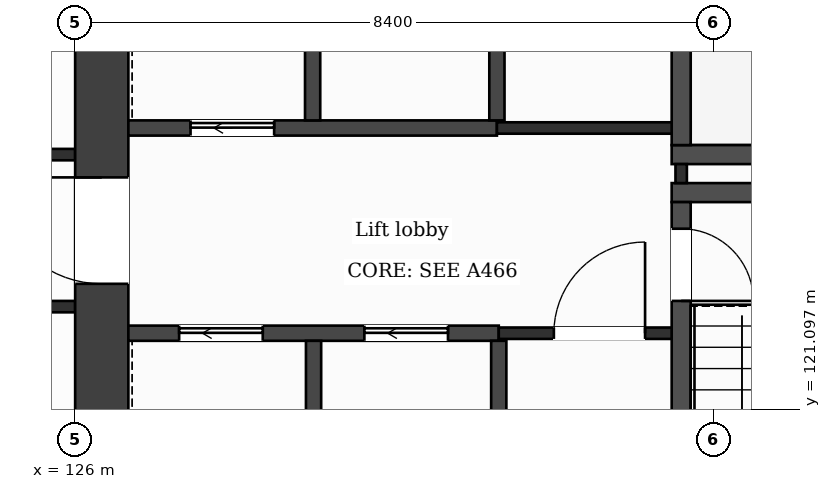
"""IFC4 building model, lengths in metres.
Left out: names, types, materials, properties, quantities, classifications, styles, units other than length and angle.
Written with IfcOpenShell. Run it as: python <this file> out.ifc"""

import sys

from ifc_helpers import new_model, si_unit, direction, frame, frame_2d, origin, place, context, subcontext, project, spatial, rectangle, extrude, element, fill, save


model = new_model("IFC4")
c1 = context("Model", 3, precision=1e-05, world=origin(), true_north=direction((0.0, 1.0)))
c2 = subcontext(c1, "Body", "Model", "MODEL_VIEW")
j1 = project(units=[si_unit("LENGTHUNIT", "METRE"), si_unit("PLANEANGLEUNIT", "RADIAN")], contexts=[c1])
p1 = place(None, origin())
s1 = spatial("IfcSite", under=j1, at=p1, CompositionType="ELEMENT")
p2 = place(p1, origin())
s2 = spatial("IfcBuilding", under=s1, at=p2, CompositionType="ELEMENT")
p3 = place(p2, frame((0.0, 0.0, 270.1)))
s3 = spatial("IfcBuildingStorey", under=s2, at=p3, CompositionType="ELEMENT", Elevation=270.1)
p4 = place(p3, frame((126.35, 110.75, 0.0), z_axis=(0.0, 0.0, 1.0), x_axis=(0.0, 1.0, 0.0)))
e1 = element("IfcWall", 1, at=p4, inside=s3, PredefinedType="SHEAR", context=c2, shape_type="SweptSolid", body=[
    extrude(rectangle(XDim=21.3, YDim=0.7, at=frame_2d((10.65, 0.0))), origin(), (0.0, 0.0, 1.0), 3.7),
])
p5 = place(p4, frame((12.0, 0.0, 0.0)))
e2 = element("IfcOpeningElement", 2, at=p5, cuts=e1, PredefinedType="OPENING", context=c2, shape_type="SweptSolid", body=[
    extrude(rectangle(XDim=1.4, YDim=2.1, at=frame_2d((0.7, 1.05))), frame((0.0, 0.36, 0.0), z_axis=(0.0, -1.0, 0.0), x_axis=(1.0, 0.0, 0.0)), (0.0, 0.0, 1.0), 0.72),
])
p6 = place(p3, frame((126.7, 122.1, 0.0), z_axis=(0.0, 0.0, 1.0), x_axis=(1.0, 0.0, 0.0)))
e3 = element("IfcWall", 3, at=p6, inside=s3, PredefinedType="PARTITIONING", context=c2, shape_type="SweptSolid", body=[
    extrude(rectangle(XDim=4.873, YDim=0.2, at=frame_2d((2.437, 0.0))), origin(), (0.0, 0.0, 1.0), 3.38),
])
p7 = place(p6, frame((3.105, 0.0, 0.0)))
e4 = element("IfcOpeningElement", 4, at=p7, cuts=e3, PredefinedType="OPENING", context=c2, shape_type="SweptSolid", body=[
    extrude(rectangle(XDim=1.1, YDim=2.1, at=frame_2d((0.55, 1.05))), frame((0.0, 0.11, 0.0), z_axis=(0.0, -1.0, 0.0), x_axis=(1.0, 0.0, 0.0)), (0.0, 0.0, 1.0), 0.22),
])
p8 = place(p6, frame((0.668, 0.0, 0.0)))
e5 = element("IfcOpeningElement", 5, at=p8, cuts=e3, PredefinedType="OPENING", context=c2, shape_type="SweptSolid", body=[
    extrude(rectangle(XDim=1.1, YDim=2.1, at=frame_2d((0.55, 1.05))), frame((0.0, 0.11, 0.0), z_axis=(0.0, -1.0, 0.0), x_axis=(1.0, 0.0, 0.0)), (0.0, 0.0, 1.0), 0.22),
])
p9 = place(p3, frame((131.573, 122.1, 0.0), z_axis=(0.0, 0.0, 1.0), x_axis=(1.0, 0.0, 0.0)))
e6 = element("IfcWall", 6, at=p9, inside=s3, PredefinedType="PARTITIONING", context=c2, shape_type="SweptSolid", body=[
    extrude(rectangle(XDim=2.4, YDim=0.15, at=frame_2d((1.2, 0.0))), origin(), (0.0, 0.0, 1.0), 3.38),
])
p10 = place(p9, frame((0.725, 0.0, 0.0)))
e7 = element("IfcOpeningElement", 7, at=p10, cuts=e6, PredefinedType="OPENING", context=c2, shape_type="SweptSolid", body=[
    extrude(rectangle(XDim=1.2, YDim=2.1, at=frame_2d((0.6, 1.05))), frame((0.0, 0.085, 0.0), z_axis=(0.0, -1.0, 0.0), x_axis=(1.0, 0.0, 0.0)), (0.0, 0.0, 1.0), 0.17),
])
p11 = place(p3, frame((100.8, 122.45, 0.0), z_axis=(0.0, 0.0, 1.0), x_axis=(1.0, 0.0, 0.0)))
e8 = element("IfcWall", 8, at=p11, inside=s3, PredefinedType="PARTITIONING", context=c2, shape_type="SweptSolid", body=[
    extrude(rectangle(XDim=25.2, YDim=0.15, at=frame_2d((12.6, 0.0))), origin(), (0.0, 0.0, 1.0), 3.38),
])
p12 = place(p11, frame((5.55, 0.0, 0.0)))
e9 = element("IfcOpeningElement", 9, at=p12, cuts=e8, PredefinedType="OPENING", context=c2, shape_type="SweptSolid", body=[
    extrude(rectangle(XDim=1.0, YDim=2.1, at=frame_2d((0.5, 1.05))), frame((0.0, 0.085, 0.0), z_axis=(0.0, -1.0, 0.0), x_axis=(1.0, 0.0, 0.0)), (0.0, 0.0, 1.0), 0.17),
])
p13 = place(p11, frame((8.862, 0.0, 0.0)))
e10 = element("IfcOpeningElement", 10, at=p13, cuts=e8, PredefinedType="OPENING", context=c2, shape_type="SweptSolid", body=[
    extrude(rectangle(XDim=0.95, YDim=2.1, at=frame_2d((0.475, 1.05))), frame((0.0, 0.085, 0.0), z_axis=(0.0, -1.0, 0.0), x_axis=(1.0, 0.0, 0.0)), (0.0, 0.0, 1.0), 0.17),
])
p14 = place(p11, frame((15.2, 0.0, 0.0)))
e11 = element("IfcOpeningElement", 11, at=p14, cuts=e8, PredefinedType="OPENING", context=c2, shape_type="SweptSolid", body=[
    extrude(rectangle(XDim=0.95, YDim=2.1, at=frame_2d((0.475, 1.05))), frame((0.0, 0.085, 0.0), z_axis=(0.0, -1.0, 0.0), x_axis=(1.0, 0.0, 0.0)), (0.0, 0.0, 1.0), 0.17),
])
p15 = place(p11, frame((17.325, 0.0, 0.0)))
e12 = element("IfcOpeningElement", 12, at=p15, cuts=e8, PredefinedType="OPENING", context=c2, shape_type="SweptSolid", body=[
    extrude(rectangle(XDim=1.0, YDim=2.1, at=frame_2d((0.5, 1.05))), frame((0.0, 0.085, 0.0), z_axis=(0.0, -1.0, 0.0), x_axis=(1.0, 0.0, 0.0)), (0.0, 0.0, 1.0), 0.17),
])
p16 = place(p11, frame((23.862, 0.0, 0.0)))
e13 = element("IfcOpeningElement", 13, at=p16, cuts=e8, PredefinedType="OPENING", context=c2, shape_type="SweptSolid", body=[
    extrude(rectangle(XDim=0.95, YDim=2.1, at=frame_2d((0.475, 1.05))), frame((0.0, 0.085, 0.0), z_axis=(0.0, -1.0, 0.0), x_axis=(1.0, 0.0, 0.0)), (0.0, 0.0, 1.0), 0.17),
])
for number, where, z_axis, x_axis in (
    (14, (133.848, 123.95, 0.0), (0.0, 0.0, 1.0), (1.0, 0.0, 0.0)),
    (15, (133.848, 124.45, 0.0), (0.0, 0.0, 1.0), (1.0, 0.0, 0.0)),
):
    element("IfcWall", number, at=place(p3, frame(where, z_axis=z_axis, x_axis=x_axis)), inside=s3, PredefinedType="PARTITIONING", context=c2, shape_type="SweptSolid", body=[
        extrude(rectangle(XDim=3.4, YDim=0.25, at=frame_2d((1.7, 0.0))), origin(), (0.0, 0.0, 1.0), 3.38),
    ])
p17 = place(p3, frame((100.8, 124.45, 0.0), z_axis=(0.0, 0.0, 1.0), x_axis=(1.0, 0.0, 0.0)))
e16 = element("IfcWall", 16, at=p17, inside=s3, PredefinedType="PARTITIONING", context=c2, shape_type="SweptSolid", body=[
    extrude(rectangle(XDim=25.2, YDim=0.15, at=frame_2d((12.6, 0.0))), origin(), (0.0, 0.0, 1.0), 3.38),
])
p18 = place(p17, frame((6.125, 0.0, 0.0)))
e17 = element("IfcOpeningElement", 17, at=p18, cuts=e16, PredefinedType="OPENING", context=c2, shape_type="SweptSolid", body=[
    extrude(rectangle(XDim=1.0, YDim=2.1, at=frame_2d((0.5, 1.05))), frame((0.0, 0.085, 0.0), z_axis=(0.0, -1.0, 0.0), x_axis=(1.0, 0.0, 0.0)), (0.0, 0.0, 1.0), 0.17),
])
p19 = place(p17, frame((1.325, 0.0, 0.0)))
e18 = element("IfcOpeningElement", 18, at=p19, cuts=e16, PredefinedType="OPENING", context=c2, shape_type="SweptSolid", body=[
    extrude(rectangle(XDim=1.0, YDim=2.1, at=frame_2d((0.5, 1.05))), frame((0.0, 0.085, 0.0), z_axis=(0.0, -1.0, 0.0), x_axis=(1.0, 0.0, 0.0)), (0.0, 0.0, 1.0), 0.17),
])
p20 = place(p17, frame((11.43, 0.0, 0.0)))
e19 = element("IfcOpeningElement", 19, at=p20, cuts=e16, PredefinedType="OPENING", context=c2, shape_type="SweptSolid", body=[
    extrude(rectangle(XDim=1.0, YDim=2.1, at=frame_2d((0.5, 1.05))), frame((0.0, 0.085, 0.0), z_axis=(0.0, -1.0, 0.0), x_axis=(1.0, 0.0, 0.0)), (0.0, 0.0, 1.0), 0.17),
])
p21 = place(p17, frame((21.17, 0.0, 0.0)))
e20 = element("IfcOpeningElement", 20, at=p21, cuts=e16, PredefinedType="OPENING", context=c2, shape_type="SweptSolid", body=[
    extrude(rectangle(XDim=1.0, YDim=2.1, at=frame_2d((0.5, 1.05))), frame((0.0, 0.085, 0.0), z_axis=(0.0, -1.0, 0.0), x_axis=(1.0, 0.0, 0.0)), (0.0, 0.0, 1.0), 0.17),
])
p22 = place(p3, frame((126.7, 124.8, 0.0), z_axis=(0.0, 0.0, 1.0), x_axis=(1.0, 0.0, 0.0)))
e21 = element("IfcWall", 21, at=p22, inside=s3, PredefinedType="PARTITIONING", context=c2, shape_type="SweptSolid", body=[
    extrude(rectangle(XDim=4.849, YDim=0.2, at=frame_2d((2.424, 0.0))), origin(), (0.0, 0.0, 1.0), 3.38),
])
p23 = place(p22, frame((0.818, 0.0, 0.0)))
e22 = element("IfcOpeningElement", 22, at=p23, cuts=e21, PredefinedType="OPENING", context=c2, shape_type="SweptSolid", body=[
    extrude(rectangle(XDim=1.1, YDim=2.1, at=frame_2d((0.55, 1.05))), frame((0.0, 0.11, 0.0), z_axis=(0.0, -1.0, 0.0), x_axis=(1.0, 0.0, 0.0)), (0.0, 0.0, 1.0), 0.22),
])
p24 = place(p3, frame((131.549, 124.8, 0.0), z_axis=(0.0, 0.0, 1.0), x_axis=(1.0, 0.0, 0.0)))
e23 = element("IfcWall", 23, at=p24, inside=s3, PredefinedType="PARTITIONING", context=c2, shape_type="SweptSolid", body=[
    extrude(rectangle(XDim=2.549, YDim=0.15, at=frame_2d((1.275, 0.0))), origin(), (0.0, 0.0, 1.0), 3.38),
])
for number, where, z_axis, x_axis in (
    (24, (129.124, 124.9, 0.0), (0.0, 0.0, 1.0), (0.0, 1.0, 0.0)),
    (25, (129.136, 118.9, 0.0), (0.0, 0.0, 1.0), (0.0, 1.0, 0.0)),
    (26, (131.549, 124.9, 0.0), (0.0, 0.0, 1.0), (0.0, 1.0, 0.0)),
):
    element("IfcWall", number, at=place(p3, frame(where, z_axis=z_axis, x_axis=x_axis)), inside=s3, PredefinedType="PARTITIONING", context=c2, shape_type="SweptSolid", body=[
        extrude(rectangle(XDim=3.1, YDim=0.2, at=frame_2d((1.55, 0.0))), origin(), (0.0, 0.0, 1.0), 3.38),
    ])
p25 = place(p3, frame((131.573, 116.67, 0.0), z_axis=(0.0, 0.0, 1.0), x_axis=(0.0, 1.0, 0.0)))
e27 = element("IfcWall", 27, at=p25, inside=s3, PredefinedType="PARTITIONING", context=c2, shape_type="SweptSolid", body=[
    extrude(rectangle(XDim=5.33, YDim=0.2, at=frame_2d((2.665, 0.0))), origin(), (0.0, 0.0, 1.0), 3.38),
])
p26 = place(p25, frame((0.88, 0.0, 0.0)))
e28 = element("IfcOpeningElement", 28, at=p26, cuts=e27, PredefinedType="OPENING", context=c2, shape_type="SweptSolid", body=[
    extrude(rectangle(XDim=0.9, YDim=2.1, at=frame_2d((0.45, 1.05))), frame((0.0, 0.11, 0.0), z_axis=(0.0, -1.0, 0.0), x_axis=(1.0, 0.0, 0.0)), (0.0, 0.0, 1.0), 0.22),
])
p27 = place(p3, frame((133.973, 124.075, 0.0), z_axis=(0.0, 0.0, 1.0), x_axis=(0.0, 1.0, 0.0)))
e29 = element("IfcWall", 29, at=p27, inside=s3, PredefinedType="PARTITIONING", context=c2, shape_type="SweptSolid", body=[
    extrude(rectangle(XDim=0.25, YDim=0.15, at=frame_2d((0.125, 0.0))), origin(), (0.0, 0.0, 1.0), 3.38),
])
p28 = place(p3, frame((133.973, 116.67, 0.0), z_axis=(0.0, 0.0, 1.0), x_axis=(0.0, 1.0, 0.0)))
e30 = element("IfcWall", 30, at=p28, inside=s3, PredefinedType="PARTITIONING", context=c2, shape_type="SweptSolid", body=[
    extrude(rectangle(XDim=7.155, YDim=0.25, at=frame_2d((3.578, 0.0))), origin(), (0.0, 0.0, 1.0), 3.38),
])
p29 = place(p28, frame((5.855, 0.0, 0.0)))
e31 = element("IfcOpeningElement", 31, at=p29, cuts=e30, PredefinedType="OPENING", context=c2, shape_type="SweptSolid", body=[
    extrude(rectangle(XDim=0.95, YDim=2.1, at=frame_2d((0.475, 1.05))), frame((0.0, 0.135, 0.0), z_axis=(0.0, -1.0, 0.0), x_axis=(1.0, 0.0, 0.0)), (0.0, 0.0, 1.0), 0.27),
])
p30 = place(p3, frame((133.973, 124.575, 0.0), z_axis=(0.0, 0.0, 1.0), x_axis=(0.0, 1.0, 0.0)))
e32 = element("IfcWall", 32, at=p30, inside=s3, PredefinedType="PARTITIONING", context=c2, shape_type="SweptSolid", body=[
    extrude(rectangle(XDim=7.155, YDim=0.25, at=frame_2d((3.578, 0.0))), origin(), (0.0, 0.0, 1.0), 3.38),
])
p31 = place(p30, frame((5.325, 0.0, 0.0)))
e33 = element("IfcOpeningElement", 33, at=p31, cuts=e32, PredefinedType="OPENING", context=c2, shape_type="SweptSolid", body=[
    extrude(rectangle(XDim=1.0, YDim=2.1, at=frame_2d((0.5, 1.05))), frame((0.0, 0.135, 0.0), z_axis=(0.0, -1.0, 0.0), x_axis=(1.0, 0.0, 0.0)), (0.0, 0.0, 1.0), 0.27),
])
p32 = place(p10, origin())
e34 = element("IfcDoor", 34, at=p32, inside=s3, OperationType="SINGLE_SWING_RIGHT", PredefinedType="DOOR", context=c2, shape_type="SweptSolid", body=[
    extrude(rectangle(XDim=1.2, YDim=2.1, at=frame_2d((0.6, 1.05))), frame((0.0, 0.025, 0.0), z_axis=(0.0, -1.0, 0.0), x_axis=(1.0, 0.0, 0.0)), (0.0, 0.0, 1.0), 0.05),
])
fill(e7, e34)
p33 = place(p7, origin())
e35 = element("IfcDoor", 35, at=p33, inside=s3, OperationType="SLIDING_TO_LEFT", PredefinedType="DOOR", context=c2, shape_type="SweptSolid", body=[
    extrude(rectangle(XDim=1.1, YDim=2.1, at=frame_2d((0.55, 1.05))), frame((0.0, 0.025, 0.0), z_axis=(0.0, -1.0, 0.0), x_axis=(1.0, 0.0, 0.0)), (0.0, 0.0, 1.0), 0.05),
])
fill(e4, e35)
p34 = place(p8, origin())
e36 = element("IfcDoor", 36, at=p34, inside=s3, OperationType="SLIDING_TO_LEFT", PredefinedType="DOOR", context=c2, shape_type="SweptSolid", body=[
    extrude(rectangle(XDim=1.1, YDim=2.1, at=frame_2d((0.55, 1.05))), frame((0.0, 0.025, 0.0), z_axis=(0.0, -1.0, 0.0), x_axis=(1.0, 0.0, 0.0)), (0.0, 0.0, 1.0), 0.05),
])
fill(e5, e36)
p35 = place(p23, origin())
e37 = element("IfcDoor", 37, at=p35, inside=s3, OperationType="SLIDING_TO_LEFT", PredefinedType="DOOR", context=c2, shape_type="SweptSolid", body=[
    extrude(rectangle(XDim=1.1, YDim=2.1, at=frame_2d((0.55, 1.05))), frame((0.0, 0.025, 0.0), z_axis=(0.0, -1.0, 0.0), x_axis=(1.0, 0.0, 0.0)), (0.0, 0.0, 1.0), 0.05),
])
fill(e22, e37)
p36 = place(p29, origin())
e38 = element("IfcDoor", 38, at=p36, inside=s3, OperationType="SINGLE_SWING_LEFT", PredefinedType="DOOR", context=c2, shape_type="SweptSolid", body=[
    extrude(rectangle(XDim=0.95, YDim=2.1, at=frame_2d((0.475, 1.05))), frame((0.0, 0.025, 0.0), z_axis=(0.0, -1.0, 0.0), x_axis=(1.0, 0.0, 0.0)), (0.0, 0.0, 1.0), 0.05),
])
fill(e31, e38)
p37 = place(p5, origin())
e39 = element("IfcDoor", 39, at=p37, inside=s3, OperationType="SINGLE_SWING_RIGHT", PredefinedType="DOOR", context=c2, shape_type="SweptSolid", body=[
    extrude(rectangle(XDim=1.4, YDim=2.1, at=frame_2d((0.7, 1.05))), frame((0.0, 0.025, 0.0), z_axis=(0.0, -1.0, 0.0), x_axis=(1.0, 0.0, 0.0)), (0.0, 0.0, 1.0), 0.05),
])
fill(e2, e39)
save(model, sys.argv[1])
